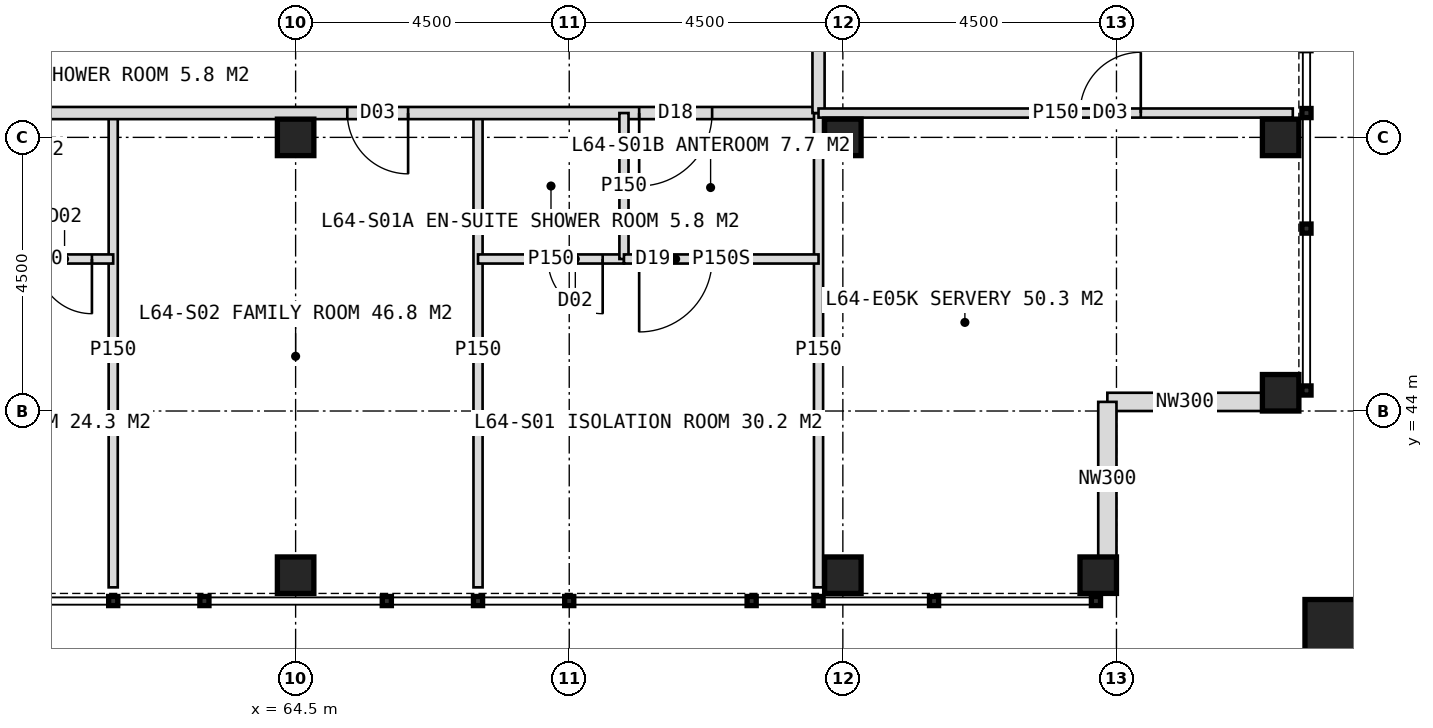
"""IFC4 building model, lengths in metres.
Left out: names, types, materials, properties, quantities, classifications, styles, units other than length and angle.
Written with IfcOpenShell. Run it as: python <this file> out.ifc"""

import sys

from ifc_helpers import new_model, si_unit, direction, frame, frame_2d, origin, origin_2d, place, context, subcontext, project, spatial, rectangle, hollow_rectangle, extrude, element, fill, save


model = new_model("IFC4")
c1 = context("Model", 3, precision=1e-05, world=origin(), true_north=direction((0.0, 1.0)))
c2 = subcontext(c1, "Body", "Model", "MODEL_VIEW")
j1 = project(units=[si_unit("LENGTHUNIT", "METRE"), si_unit("PLANEANGLEUNIT", "RADIAN")], contexts=[c1])
p1 = place(None, origin())
s1 = spatial("IfcSite", under=j1, at=p1, CompositionType="ELEMENT")
p2 = place(p1, origin())
s2 = spatial("IfcBuilding", under=s1, at=p2, CompositionType="ELEMENT")
p3 = place(p2, frame((0.0, 0.0, 266.0)))
s3 = spatial("IfcBuildingStorey", under=s2, at=p3, CompositionType="ELEMENT", Elevation=266.0)
for number, where, z_axis, x_axis in (
    (1, (73.5, 48.5, 0.0), (0.0, 0.0, 1.0), (1.0, 0.0, 0.0)),
    (2, (64.5, 48.5, 0.0), (0.0, 0.0, 1.0), (1.0, 0.0, 0.0)),
    (3, (80.7, 44.3, 0.0), (0.0, 0.0, 1.0), (1.0, 0.0, 0.0)),
    (4, (80.7, 48.5, 0.0), (0.0, 0.0, 1.0), (1.0, 0.0, 0.0)),
    (5, (64.5, 41.3, 0.0), (0.0, 0.0, 1.0), (1.0, 0.0, 0.0)),
    (6, (73.5, 41.3, 0.0), (0.0, 0.0, 1.0), (1.0, 0.0, 0.0)),
    (7, (77.7, 41.3, 0.0), (0.0, 0.0, 1.0), (1.0, 0.0, 0.0)),
):
    element("IfcColumn", number, at=place(p3, frame(where, z_axis=z_axis, x_axis=x_axis)), inside=s3, PredefinedType="COLUMN", context=c2, shape_type="SweptSolid", body=[
        extrude(hollow_rectangle(XDim=0.6, YDim=0.6, WallThickness=0.04, at=origin_2d()), origin(), (0.0, 0.0, 1.0), 4.0),
    ])
p4 = place(p3, frame((81.6, 40.4, 0.0), z_axis=(0.0, 0.0, 1.0), x_axis=(1.0, 0.0, 0.0)))
e8 = element("IfcColumn", 8, at=p4, inside=s3, PredefinedType="COLUMN", context=c2, shape_type="SweptSolid", body=[
    extrude(hollow_rectangle(XDim=1.0, YDim=1.0, WallThickness=0.06, at=origin_2d()), origin(), (0.0, 0.0, 1.0), 4.0),
])
for number, where, z_axis, x_axis in (
    (9, (80.4, 44.15, 0.0), (0.0, 0.0, 1.0), (-1.0, 0.0, 0.0)),
    (10, (77.85, 44.15, 0.0), (0.0, 0.0, 1.0), (0.0, -1.0, 0.0)),
):
    element("IfcWall", number, at=place(p3, frame(where, z_axis=z_axis, x_axis=x_axis)), inside=s3, PredefinedType="ELEMENTEDWALL", context=c2, shape_type="SweptSolid", body=[
        extrude(rectangle(XDim=2.55, YDim=0.3, at=frame_2d((1.275, 0.0))), origin(), (0.0, 0.0, 1.0), 2.95),
    ])
for number, where, z_axis, x_axis in (
    (11, (67.5, 48.9, 0.0), (0.0, 0.0, 1.0), (0.0, -1.0, 0.0)),
    (12, (61.5, 48.9, 0.0), (0.0, 0.0, 1.0), (0.0, -1.0, 0.0)),
):
    element("IfcWall", number, at=place(p3, frame(where, z_axis=z_axis, x_axis=x_axis)), inside=s3, PredefinedType="PARTITIONING", context=c2, shape_type="SweptSolid", body=[
        extrude(rectangle(XDim=7.8, YDim=0.15, at=frame_2d((3.9, 0.0))), origin(), (0.0, 0.0, 1.0), 3.75),
    ])
p5 = place(p3, frame((73.1, 48.9, 0.0), z_axis=(0.0, 0.0, 1.0), x_axis=(-1.0, 0.0, 0.0)))
e13 = element("IfcWall", 13, at=p5, inside=s3, PredefinedType="PARTITIONING", context=c2, shape_type="SweptSolid", body=[
    extrude(rectangle(XDim=26.2, YDim=0.2, at=frame_2d((13.1, 0.0))), origin(), (0.0, 0.0, 1.0), 3.75),
])
p6 = place(p5, frame((1.75, 0.0, 0.0)))
e14 = element("IfcOpeningElement", 14, at=p6, cuts=e13, PredefinedType="OPENING", context=c2, shape_type="SweptSolid", body=[
    extrude(rectangle(XDim=1.2, YDim=2.2, at=frame_2d((0.6, 1.1))), frame((0.0, 0.11, 0.0), z_axis=(0.0, -1.0, 0.0), x_axis=(1.0, 0.0, 0.0)), (0.0, 0.0, 1.0), 0.22),
])
p7 = place(p5, frame((6.75, 0.0, 0.0)))
e15 = element("IfcOpeningElement", 15, at=p7, cuts=e13, PredefinedType="OPENING", context=c2, shape_type="SweptSolid", body=[
    extrude(rectangle(XDim=1.0, YDim=2.1, at=frame_2d((0.5, 1.05))), frame((0.0, 0.11, 0.0), z_axis=(0.0, -1.0, 0.0), x_axis=(1.0, 0.0, 0.0)), (0.0, 0.0, 1.0), 0.22),
])
p8 = place(p5, frame((14.25, 0.0, 0.0)))
e16 = element("IfcOpeningElement", 16, at=p8, cuts=e13, PredefinedType="OPENING", context=c2, shape_type="SweptSolid", body=[
    extrude(rectangle(XDim=1.2, YDim=2.2, at=frame_2d((0.6, 1.1))), frame((0.0, 0.11, 0.0), z_axis=(0.0, -1.0, 0.0), x_axis=(1.0, 0.0, 0.0)), (0.0, 0.0, 1.0), 0.22),
])
p9 = place(p5, frame((20.45, 0.0, 0.0)))
e17 = element("IfcOpeningElement", 17, at=p9, cuts=e13, PredefinedType="OPENING", context=c2, shape_type="SweptSolid", body=[
    extrude(rectangle(XDim=0.9, YDim=2.1, at=frame_2d((0.45, 1.05))), frame((0.0, 0.11, 0.0), z_axis=(0.0, -1.0, 0.0), x_axis=(1.0, 0.0, 0.0)), (0.0, 0.0, 1.0), 0.22),
])
p10 = place(p5, frame((18.45, 0.0, 0.0)))
e18 = element("IfcOpeningElement", 18, at=p10, cuts=e13, PredefinedType="OPENING", context=c2, shape_type="SweptSolid", body=[
    extrude(rectangle(XDim=1.0, YDim=2.1, at=frame_2d((0.5, 1.05))), frame((0.0, 0.11, 0.0), z_axis=(0.0, -1.0, 0.0), x_axis=(1.0, 0.0, 0.0)), (0.0, 0.0, 1.0), 0.22),
])
p11 = place(p5, frame((23.65, 0.0, 0.0)))
e19 = element("IfcOpeningElement", 19, at=p11, cuts=e13, PredefinedType="OPENING", context=c2, shape_type="SweptSolid", body=[
    extrude(rectangle(XDim=1.0, YDim=2.1, at=frame_2d((0.5, 1.05))), frame((0.0, 0.11, 0.0), z_axis=(0.0, -1.0, 0.0), x_axis=(1.0, 0.0, 0.0)), (0.0, 0.0, 1.0), 0.22),
])
p12 = place(p3, frame((73.1, 48.9, 0.0), z_axis=(0.0, 0.0, 1.0), x_axis=(0.0, -1.0, 0.0)))
e20 = element("IfcWall", 20, at=p12, inside=s3, PredefinedType="PARTITIONING", context=c2, shape_type="SweptSolid", body=[
    extrude(rectangle(XDim=7.8, YDim=0.15, at=frame_2d((3.9, 0.0))), origin(), (0.0, 0.0, 1.0), 3.75),
])
p13 = place(p3, frame((69.9, 46.5, 0.0), z_axis=(0.0, 0.0, 1.0), x_axis=(-1.0, 0.0, 0.0)))
e21 = element("IfcWall", 21, at=p13, inside=s3, PredefinedType="PARTITIONING", context=c2, shape_type="SweptSolid", body=[
    extrude(rectangle(XDim=2.4, YDim=0.15, at=frame_2d((1.2, 0.0))), origin(), (0.0, 0.0, 1.0), 3.75),
])
p14 = place(p13, frame((0.35, 0.0, 0.0)))
e22 = element("IfcOpeningElement", 22, at=p14, cuts=e21, PredefinedType="OPENING", context=c2, shape_type="SweptSolid", body=[
    extrude(rectangle(XDim=0.9, YDim=2.1, at=frame_2d((0.45, 1.05))), frame((0.0, 0.085, 0.0), z_axis=(0.0, -1.0, 0.0), x_axis=(1.0, 0.0, 0.0)), (0.0, 0.0, 1.0), 0.17),
])
p15 = place(p3, frame((69.9, 48.9, 0.0), z_axis=(0.0, 0.0, 1.0), x_axis=(0.0, -1.0, 0.0)))
e23 = element("IfcWall", 23, at=p15, inside=s3, PredefinedType="PARTITIONING", context=c2, shape_type="SweptSolid", body=[
    extrude(rectangle(XDim=2.4, YDim=0.15, at=frame_2d((1.2, 0.0))), origin(), (0.0, 0.0, 1.0), 3.75),
])
p16 = place(p3, frame((73.1, 46.5, 0.0), z_axis=(0.0, 0.0, 1.0), x_axis=(-1.0, 0.0, 0.0)))
e24 = element("IfcWall", 24, at=p16, inside=s3, PredefinedType="PARTITIONING", context=c2, shape_type="SweptSolid", body=[
    extrude(rectangle(XDim=3.2, YDim=0.15, at=frame_2d((1.6, 0.0))), origin(), (0.0, 0.0, 1.0), 3.75),
])
p17 = place(p16, frame((1.75, 0.0, 0.0)))
e25 = element("IfcOpeningElement", 25, at=p17, cuts=e24, PredefinedType="OPENING", context=c2, shape_type="SweptSolid", body=[
    extrude(rectangle(XDim=1.2, YDim=2.2, at=frame_2d((0.6, 1.1))), frame((0.0, 0.085, 0.0), z_axis=(0.0, -1.0, 0.0), x_axis=(1.0, 0.0, 0.0)), (0.0, 0.0, 1.0), 0.17),
])
p18 = place(p3, frame((61.5, 46.5, 0.0), z_axis=(0.0, 0.0, 1.0), x_axis=(-1.0, 0.0, 0.0)))
e26 = element("IfcWall", 26, at=p18, inside=s3, PredefinedType="PARTITIONING", context=c2, shape_type="SweptSolid", body=[
    extrude(rectangle(XDim=2.4, YDim=0.15, at=frame_2d((1.2, 0.0))), origin(), (0.0, 0.0, 1.0), 3.75),
])
p19 = place(p18, frame((0.35, 0.0, 0.0)))
e27 = element("IfcOpeningElement", 27, at=p19, cuts=e26, PredefinedType="OPENING", context=c2, shape_type="SweptSolid", body=[
    extrude(rectangle(XDim=0.9, YDim=2.1, at=frame_2d((0.45, 1.05))), frame((0.0, 0.085, 0.0), z_axis=(0.0, -1.0, 0.0), x_axis=(1.0, 0.0, 0.0)), (0.0, 0.0, 1.0), 0.17),
])
p20 = place(p3, frame((73.1, 71.0, 0.0), z_axis=(0.0, 0.0, 1.0), x_axis=(0.0, -1.0, 0.0)))
e28 = element("IfcWall", 28, at=p20, inside=s3, PredefinedType="PARTITIONING", context=c2, shape_type="SweptSolid", body=[
    extrude(rectangle(XDim=22.1, YDim=0.2, at=frame_2d((11.05, 0.0))), origin(), (0.0, 0.0, 1.0), 3.75),
])
p21 = place(p20, frame((2.65, 0.0, 0.0)))
e29 = element("IfcOpeningElement", 29, at=p21, cuts=e28, PredefinedType="OPENING", context=c2, shape_type="SweptSolid", body=[
    extrude(rectangle(XDim=1.0, YDim=2.1, at=frame_2d((0.5, 1.05))), frame((0.0, 0.11, 0.0), z_axis=(0.0, -1.0, 0.0), x_axis=(1.0, 0.0, 0.0)), (0.0, 0.0, 1.0), 0.22),
])
p22 = place(p20, frame((7.0, 0.0, 0.0)))
e30 = element("IfcOpeningElement", 30, at=p22, cuts=e28, PredefinedType="OPENING", context=c2, shape_type="SweptSolid", body=[
    extrude(rectangle(XDim=1.0, YDim=2.1, at=frame_2d((0.5, 1.05))), frame((0.0, 0.11, 0.0), z_axis=(0.0, -1.0, 0.0), x_axis=(1.0, 0.0, 0.0)), (0.0, 0.0, 1.0), 0.22),
])
p23 = place(p20, frame((14.35, 0.0, 0.0)))
e31 = element("IfcOpeningElement", 31, at=p23, cuts=e28, PredefinedType="OPENING", context=c2, shape_type="SweptSolid", body=[
    extrude(rectangle(XDim=1.2, YDim=2.2, at=frame_2d((0.6, 1.1))), frame((0.0, 0.11, 0.0), z_axis=(0.0, -1.0, 0.0), x_axis=(1.0, 0.0, 0.0)), (0.0, 0.0, 1.0), 0.22),
])
p24 = place(p20, frame((18.7, 0.0, 0.0)))
e32 = element("IfcOpeningElement", 32, at=p24, cuts=e28, PredefinedType="OPENING", context=c2, shape_type="SweptSolid", body=[
    extrude(rectangle(XDim=1.2, YDim=2.2, at=frame_2d((0.6, 1.1))), frame((0.0, 0.11, 0.0), z_axis=(0.0, -1.0, 0.0), x_axis=(1.0, 0.0, 0.0)), (0.0, 0.0, 1.0), 0.22),
])
p25 = place(p3, frame((73.1, 48.9, 0.0), z_axis=(0.0, 0.0, 1.0), x_axis=(1.0, 0.0, 0.0)))
e33 = element("IfcWall", 33, at=p25, inside=s3, PredefinedType="PARTITIONING", context=c2, shape_type="SweptSolid", body=[
    extrude(rectangle(XDim=7.8, YDim=0.15, at=frame_2d((3.9, 0.0))), origin(), (0.0, 0.0, 1.0), 3.75),
])
p26 = place(p25, frame((4.3, 0.0, 0.0)))
e34 = element("IfcOpeningElement", 34, at=p26, cuts=e33, PredefinedType="OPENING", context=c2, shape_type="SweptSolid", body=[
    extrude(rectangle(XDim=1.0, YDim=2.1, at=frame_2d((0.5, 1.05))), frame((0.0, 0.085, 0.0), z_axis=(0.0, -1.0, 0.0), x_axis=(1.0, 0.0, 0.0)), (0.0, 0.0, 1.0), 0.17),
])
p27 = place(p17, origin())
e35 = element("IfcDoor", 35, at=p27, inside=s3, OperationType="SINGLE_SWING_RIGHT", PredefinedType="DOOR", context=c2, shape_type="SweptSolid", body=[
    extrude(rectangle(XDim=1.2, YDim=2.2, at=frame_2d((0.6, 1.1))), frame((0.0, 0.025, 0.0), z_axis=(0.0, -1.0, 0.0), x_axis=(1.0, 0.0, 0.0)), (0.0, 0.0, 1.0), 0.05),
])
fill(e25, e35)
p28 = place(p6, origin())
e36 = element("IfcDoor", 36, at=p28, inside=s3, OperationType="SINGLE_SWING_RIGHT", PredefinedType="DOOR", context=c2, shape_type="SweptSolid", body=[
    extrude(rectangle(XDim=1.2, YDim=2.2, at=frame_2d((0.6, 1.1))), frame((0.0, 0.025, 0.0), z_axis=(0.0, -1.0, 0.0), x_axis=(1.0, 0.0, 0.0)), (0.0, 0.0, 1.0), 0.05),
])
fill(e14, e36)
p29 = place(p14, origin())
e37 = element("IfcDoor", 37, at=p29, inside=s3, OperationType="SINGLE_SWING_LEFT", PredefinedType="DOOR", context=c2, shape_type="SweptSolid", body=[
    extrude(rectangle(XDim=0.9, YDim=2.1, at=frame_2d((0.45, 1.05))), frame((0.0, 0.025, 0.0), z_axis=(0.0, -1.0, 0.0), x_axis=(1.0, 0.0, 0.0)), (0.0, 0.0, 1.0), 0.05),
])
fill(e22, e37)
p30 = place(p7, origin())
e38 = element("IfcDoor", 38, at=p30, inside=s3, OperationType="SINGLE_SWING_LEFT", PredefinedType="DOOR", context=c2, shape_type="SweptSolid", body=[
    extrude(rectangle(XDim=1.0, YDim=2.1, at=frame_2d((0.5, 1.05))), frame((0.0, 0.025, 0.0), z_axis=(0.0, -1.0, 0.0), x_axis=(1.0, 0.0, 0.0)), (0.0, 0.0, 1.0), 0.05),
])
fill(e15, e38)
p31 = place(p19, origin())
e39 = element("IfcDoor", 39, at=p31, inside=s3, OperationType="SINGLE_SWING_LEFT", PredefinedType="DOOR", context=c2, shape_type="SweptSolid", body=[
    extrude(rectangle(XDim=0.9, YDim=2.1, at=frame_2d((0.45, 1.05))), frame((0.0, 0.025, 0.0), z_axis=(0.0, -1.0, 0.0), x_axis=(1.0, 0.0, 0.0)), (0.0, 0.0, 1.0), 0.05),
])
fill(e27, e39)
p32 = place(p26, origin())
e40 = element("IfcDoor", 40, at=p32, inside=s3, OperationType="SINGLE_SWING_RIGHT", PredefinedType="DOOR", context=c2, shape_type="SweptSolid", body=[
    extrude(rectangle(XDim=1.0, YDim=2.1, at=frame_2d((0.5, 1.05))), frame((0.0, 0.025, 0.0), z_axis=(0.0, -1.0, 0.0), x_axis=(1.0, 0.0, 0.0)), (0.0, 0.0, 1.0), 0.05),
])
fill(e34, e40)
save(model, sys.argv[1])
